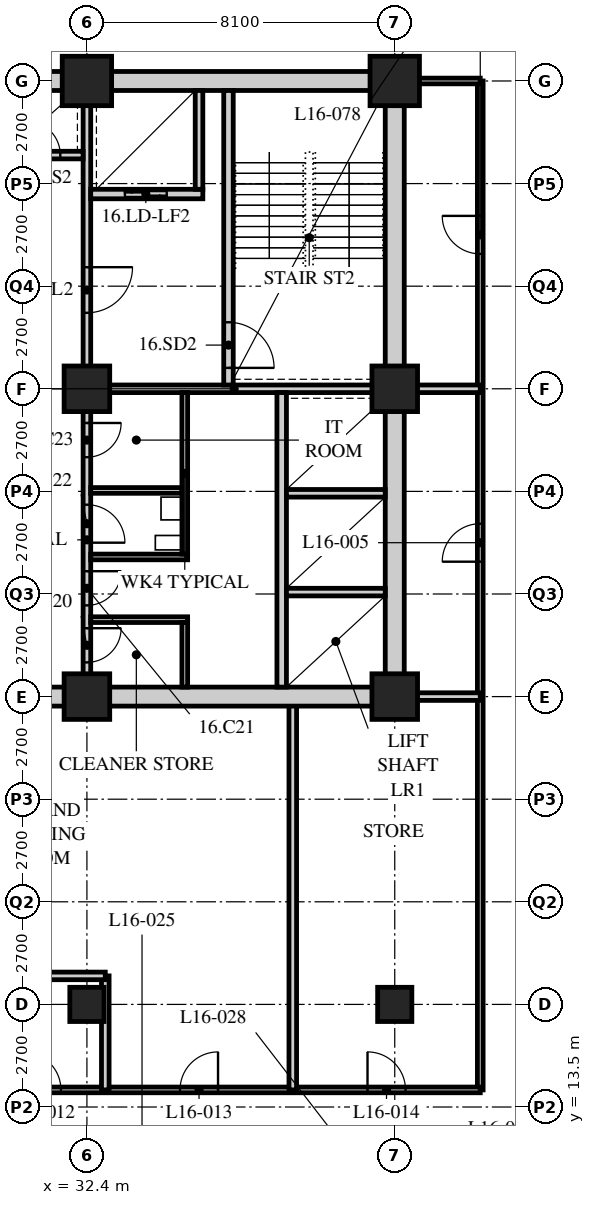
"""IFC4 building model, lengths in metres.
Left out: names, types, materials, properties, quantities, classifications, styles, units other than length and angle.
Written with IfcOpenShell. Run it as: python <this file> out.ifc"""

import sys

from ifc_helpers import new_model, si_unit, direction, frame, frame_2d, origin, origin_2d, place, context, subcontext, project, spatial, rectangle, hollow_rectangle, extrude, element, fill, save


model = new_model("IFC4")
c1 = context("Model", 3, precision=1e-05, world=origin(), true_north=direction((0.0, 1.0)))
c2 = subcontext(c1, "Body", "Model", "MODEL_VIEW")
j1 = project(units=[si_unit("LENGTHUNIT", "METRE"), si_unit("PLANEANGLEUNIT", "RADIAN")], contexts=[c1])
p1 = place(None, origin())
s1 = spatial("IfcSite", under=j1, at=p1, CompositionType="ELEMENT")
p2 = place(p1, origin())
s2 = spatial("IfcBuilding", under=s1, at=p2, CompositionType="ELEMENT")
p3 = place(p2, frame((0.0, 0.0, 67.0)))
s3 = spatial("IfcBuildingStorey", under=s2, at=p3, CompositionType="ELEMENT", Elevation=67.0)
p4 = place(p3, frame((32.4, 16.2, 0.0), z_axis=(0.0, 0.0, 1.0), x_axis=(1.0, 0.0, 0.0)))
e1 = element("IfcColumn", 1, at=p4, inside=s3, PredefinedType="COLUMN", context=c2, shape_type="SweptSolid", body=[
    extrude(hollow_rectangle(XDim=0.9, YDim=0.9, WallThickness=0.09, at=origin_2d()), origin(), (0.0, 0.0, 1.0), 3.4),
])
for number, where, z_axis, x_axis in (
    (2, (32.4, 24.3, 0.0), (0.0, 0.0, 1.0), (1.0, 0.0, 0.0)),
    (3, (32.4, 32.4, 0.0), (0.0, 0.0, 1.0), (1.0, 0.0, 0.0)),
):
    element("IfcColumn", number, at=place(p3, frame(where, z_axis=z_axis, x_axis=x_axis)), inside=s3, PredefinedType="COLUMN", context=c2, shape_type="SweptSolid", body=[
        extrude(hollow_rectangle(XDim=1.2, YDim=1.2, WallThickness=0.12, at=origin_2d()), origin(), (0.0, 0.0, 1.0), 3.4),
    ])
p5 = place(p3, frame((32.4, 40.5, 0.0), z_axis=(0.0, 0.0, 1.0), x_axis=(1.0, 0.0, 0.0)))
e4 = element("IfcColumn", 4, at=p5, inside=s3, PredefinedType="COLUMN", context=c2, shape_type="SweptSolid", body=[
    extrude(hollow_rectangle(XDim=1.3, YDim=1.3, WallThickness=0.13, at=origin_2d()), origin(), (0.0, 0.0, 1.0), 3.4),
])
p6 = place(p3, frame((40.5, 16.2, 0.0), z_axis=(0.0, 0.0, 1.0), x_axis=(1.0, 0.0, 0.0)))
e5 = element("IfcColumn", 5, at=p6, inside=s3, PredefinedType="COLUMN", context=c2, shape_type="SweptSolid", body=[
    extrude(hollow_rectangle(XDim=0.9, YDim=0.9, WallThickness=0.09, at=origin_2d()), origin(), (0.0, 0.0, 1.0), 3.4),
])
for number, where, z_axis, x_axis in (
    (6, (40.5, 24.3, 0.0), (0.0, 0.0, 1.0), (1.0, 0.0, 0.0)),
    (7, (40.5, 32.4, 0.0), (0.0, 0.0, 1.0), (1.0, 0.0, 0.0)),
):
    element("IfcColumn", number, at=place(p3, frame(where, z_axis=z_axis, x_axis=x_axis)), inside=s3, PredefinedType="COLUMN", context=c2, shape_type="SweptSolid", body=[
        extrude(hollow_rectangle(XDim=1.2, YDim=1.2, WallThickness=0.12, at=origin_2d()), origin(), (0.0, 0.0, 1.0), 3.4),
    ])
p7 = place(p3, frame((40.5, 40.5, 0.0), z_axis=(0.0, 0.0, 1.0), x_axis=(1.0, 0.0, 0.0)))
e8 = element("IfcColumn", 8, at=p7, inside=s3, PredefinedType="COLUMN", context=c2, shape_type="SweptSolid", body=[
    extrude(hollow_rectangle(XDim=1.3, YDim=1.3, WallThickness=0.13, at=origin_2d()), origin(), (0.0, 0.0, 1.0), 3.4),
])
p8 = place(p3, frame((42.75, 13.95, 0.0), z_axis=(0.0, 0.0, 1.0), x_axis=(0.0, 1.0, 0.0)))
e9 = element("IfcWall", 9, at=p8, inside=s3, PredefinedType="PARTITIONING", context=c2, shape_type="SweptSolid", body=[
    extrude(rectangle(XDim=26.55, YDim=0.15, at=frame_2d((13.275, 0.0))), origin(), (0.0, 0.0, 1.0), 3.19),
])
p9 = place(p8, frame((13.9, 0.0, 0.0)))
e10 = element("IfcOpeningElement", 10, at=p9, cuts=e9, PredefinedType="OPENING", context=c2, shape_type="SweptSolid", body=[
    extrude(rectangle(XDim=1.0, YDim=2.1, at=frame_2d((0.5, 1.05))), frame((0.0, 0.085, 0.0), z_axis=(0.0, -1.0, 0.0), x_axis=(1.0, 0.0, 0.0)), (0.0, 0.0, 1.0), 0.17),
])
p10 = place(p8, frame((22.0, 0.0, 0.0)))
e11 = element("IfcOpeningElement", 11, at=p10, cuts=e9, PredefinedType="OPENING", context=c2, shape_type="SweptSolid", body=[
    extrude(rectangle(XDim=1.0, YDim=2.1, at=frame_2d((0.5, 1.05))), frame((0.0, 0.085, 0.0), z_axis=(0.0, -1.0, 0.0), x_axis=(1.0, 0.0, 0.0)), (0.0, 0.0, 1.0), 0.17),
])
p11 = place(p3, frame((42.75, 40.5, 0.0), z_axis=(0.0, 0.0, 1.0), x_axis=(-1.0, 0.0, 0.0)))
e12 = element("IfcWall", 12, at=p11, inside=s3, PredefinedType="PARTITIONING", context=c2, shape_type="SweptSolid", body=[
    extrude(rectangle(XDim=2.05, YDim=0.15, at=frame_2d((1.025, 0.0))), origin(), (0.0, 0.0, 1.0), 2.578),
])
p12 = place(p3, frame((29.56, 13.95, 0.0), z_axis=(0.0, 0.0, 1.0), x_axis=(1.0, 0.0, 0.0)))
e13 = element("IfcWall", 13, at=p12, inside=s3, PredefinedType="PARTITIONING", context=c2, shape_type="SweptSolid", body=[
    extrude(rectangle(XDim=13.19, YDim=0.15, at=frame_2d((6.595, 0.0))), origin(), (0.0, 0.0, 1.0), 3.19),
])
p13 = place(p12, frame((1.157, 0.0, 0.0)))
e14 = element("IfcOpeningElement", 14, at=p13, cuts=e13, PredefinedType="OPENING", context=c2, shape_type="SweptSolid", body=[
    extrude(rectangle(XDim=1.0, YDim=2.1, at=frame_2d((0.5, 1.05))), frame((0.0, 0.085, 0.0), z_axis=(0.0, -1.0, 0.0), x_axis=(1.0, 0.0, 0.0)), (0.0, 0.0, 1.0), 0.17),
])
p14 = place(p12, frame((5.29, 0.0, 0.0)))
e15 = element("IfcOpeningElement", 15, at=p14, cuts=e13, PredefinedType="OPENING", context=c2, shape_type="SweptSolid", body=[
    extrude(rectangle(XDim=1.0, YDim=2.1, at=frame_2d((0.5, 1.05))), frame((0.0, 0.085, 0.0), z_axis=(0.0, -1.0, 0.0), x_axis=(1.0, 0.0, 0.0)), (0.0, 0.0, 1.0), 0.17),
])
p15 = place(p12, frame((10.223, 0.0, 0.0)))
e16 = element("IfcOpeningElement", 16, at=p15, cuts=e13, PredefinedType="OPENING", context=c2, shape_type="SweptSolid", body=[
    extrude(rectangle(XDim=1.0, YDim=2.1, at=frame_2d((0.5, 1.05))), frame((0.0, 0.085, 0.0), z_axis=(0.0, -1.0, 0.0), x_axis=(1.0, 0.0, 0.0)), (0.0, 0.0, 1.0), 0.17),
])
p16 = place(p3, frame((40.5, 32.4, 0.0), z_axis=(0.0, 0.0, 1.0), x_axis=(1.0, 0.0, 0.0)))
e17 = element("IfcWall", 17, at=p16, inside=s3, PredefinedType="SOLIDWALL", context=c2, shape_type="SweptSolid", body=[
    extrude(rectangle(XDim=2.25, YDim=0.2, at=frame_2d((1.125, 0.0))), origin(), (0.0, 0.0, 1.0), 2.578),
])
p17 = place(p3, frame((32.883, 13.95, 0.0), z_axis=(0.0, 0.0, 1.0), x_axis=(0.0, 1.0, 0.0)))
e18 = element("IfcWall", 18, at=p17, inside=s3, PredefinedType="SOLIDWALL", context=c2, shape_type="SweptSolid", body=[
    extrude(rectangle(XDim=3.0, YDim=0.2, at=frame_2d((1.5, 0.0))), origin(), (0.0, 0.0, 1.0), 3.19),
])
p18 = place(p3, frame((29.55, 16.95, 0.0), z_axis=(0.0, 0.0, 1.0), x_axis=(1.0, 0.0, 0.0)))
e19 = element("IfcWall", 19, at=p18, inside=s3, PredefinedType="SOLIDWALL", context=c2, shape_type="SweptSolid", body=[
    extrude(rectangle(XDim=3.333, YDim=0.2, at=frame_2d((1.667, 0.0))), origin(), (0.0, 0.0, 1.0), 3.19),
])
p19 = place(p3, frame((37.817, 13.95, 0.0), z_axis=(0.0, 0.0, 1.0), x_axis=(0.0, 1.0, 0.0)))
e20 = element("IfcWall", 20, at=p19, inside=s3, PredefinedType="SOLIDWALL", context=c2, shape_type="SweptSolid", body=[
    extrude(rectangle(XDim=10.35, YDim=0.2, at=frame_2d((5.175, 0.0))), origin(), (0.0, 0.0, 1.0), 3.19),
])
p20 = place(p3, frame((40.5, 24.3, 0.0), z_axis=(0.0, 0.0, 1.0), x_axis=(1.0, 0.0, 0.0)))
e21 = element("IfcWall", 21, at=p20, inside=s3, PredefinedType="SOLIDWALL", context=c2, shape_type="SweptSolid", body=[
    extrude(rectangle(XDim=2.25, YDim=0.2, at=frame_2d((1.125, 0.0))), origin(), (0.0, 0.0, 1.0), 2.578),
])
p21 = place(p3, frame((15.95, 24.3, 0.0), z_axis=(0.0, 0.0, 1.0), x_axis=(1.0, 0.0, 0.0)))
e22 = element("IfcWall", 22, at=p21, inside=s3, PredefinedType="SOLIDWALL", context=c2, shape_type="SweptSolid", body=[
    extrude(rectangle(XDim=24.8, YDim=0.5, at=frame_2d((12.4, 0.0))), origin(), (0.0, 0.0, 1.0), 2.54),
])
p22 = place(p21, frame((11.5, 0.0, 0.0)))
e23 = element("IfcOpeningElement", 23, at=p22, cuts=e22, PredefinedType="OPENING", context=c2, shape_type="SweptSolid", body=[
    extrude(rectangle(XDim=1.8, YDim=2.4, at=frame_2d((0.9, 1.2))), frame((0.0, 0.26, 0.0), z_axis=(0.0, -1.0, 0.0), x_axis=(1.0, 0.0, 0.0)), (0.0, 0.0, 1.0), 0.52),
])
p23 = place(p3, frame((15.95, 40.5, 0.0), z_axis=(0.0, 0.0, 1.0), x_axis=(1.0, 0.0, 0.0)))
e24 = element("IfcWall", 24, at=p23, inside=s3, PredefinedType="SOLIDWALL", context=c2, shape_type="SweptSolid", body=[
    extrude(rectangle(XDim=24.8, YDim=0.5, at=frame_2d((12.4, 0.0))), origin(), (0.0, 0.0, 1.0), 2.54),
])
p24 = place(p23, frame((11.5, 0.0, 0.0)))
e25 = element("IfcOpeningElement", 25, at=p24, cuts=e24, PredefinedType="OPENING", context=c2, shape_type="SweptSolid", body=[
    extrude(rectangle(XDim=1.8, YDim=2.4, at=frame_2d((0.9, 1.2))), frame((0.0, 0.26, 0.0), z_axis=(0.0, -1.0, 0.0), x_axis=(1.0, 0.0, 0.0)), (0.0, 0.0, 1.0), 0.52),
])
p25 = place(p3, frame((40.5, 24.55, 0.0), z_axis=(0.0, 0.0, 1.0), x_axis=(0.0, 1.0, 0.0)))
e26 = element("IfcWall", 26, at=p25, inside=s3, PredefinedType="SOLIDWALL", context=c2, shape_type="SweptSolid", body=[
    extrude(rectangle(XDim=15.7, YDim=0.5, at=frame_2d((7.85, 0.0))), origin(), (0.0, 0.0, 1.0), 2.578),
])
p26 = place(p3, frame((32.3, 32.4, 0.0), z_axis=(0.0, 0.0, 1.0), x_axis=(1.0, 0.0, 0.0)))
e27 = element("IfcWall", 27, at=p26, inside=s3, PredefinedType="SOLIDWALL", context=c2, shape_type="SweptSolid", body=[
    extrude(rectangle(XDim=7.95, YDim=0.2, at=frame_2d((3.975, 0.0))), origin(), (0.0, 0.0, 1.0), 2.578),
])
p27 = place(p3, frame((32.4, 32.5, 0.0), z_axis=(0.0, 0.0, 1.0), x_axis=(0.0, 1.0, 0.0)))
e28 = element("IfcWall", 28, at=p27, inside=s3, PredefinedType="SOLIDWALL", context=c2, shape_type="SweptSolid", body=[
    extrude(rectangle(XDim=7.75, YDim=0.2, at=frame_2d((3.875, 0.0))), origin(), (0.0, 0.0, 1.0), 2.578),
])
p28 = place(p27, frame((1.9, 0.0, 0.0)))
e29 = element("IfcOpeningElement", 29, at=p28, cuts=e28, PredefinedType="OPENING", context=c2, shape_type="SweptSolid", body=[
    extrude(rectangle(XDim=1.2, YDim=2.1, at=frame_2d((0.6, 1.05))), frame((0.0, 0.11, 0.0), z_axis=(0.0, -1.0, 0.0), x_axis=(1.0, 0.0, 0.0)), (0.0, 0.0, 1.0), 0.22),
])
p29 = place(p3, frame((37.525, 24.55, 0.0), z_axis=(0.0, 0.0, 1.0), x_axis=(0.0, 1.0, 0.0)))
e30 = element("IfcWall", 30, at=p29, inside=s3, PredefinedType="SOLIDWALL", context=c2, shape_type="SweptSolid", body=[
    extrude(rectangle(XDim=7.75, YDim=0.25, at=frame_2d((3.875, 0.0))), origin(), (0.0, 0.0, 1.0), 3.19),
])
for number, where, z_axis, x_axis in (
    (31, (37.65, 27.05, 0.0), (0.0, 0.0, 1.0), (1.0, 0.0, 0.0)),
    (32, (37.65, 29.65, 0.0), (0.0, 0.0, 1.0), (1.0, 0.0, 0.0)),
):
    element("IfcWall", number, at=place(p3, frame(where, z_axis=z_axis, x_axis=x_axis)), inside=s3, PredefinedType="SOLIDWALL", context=c2, shape_type="SweptSolid", body=[
        extrude(rectangle(XDim=2.6, YDim=0.2, at=frame_2d((1.3, 0.0))), origin(), (0.0, 0.0, 1.0), 3.19),
    ])
p30 = place(p3, frame((36.125, 32.5, 0.0), z_axis=(0.0, 0.0, 1.0), x_axis=(0.0, 1.0, 0.0)))
e33 = element("IfcWall", 33, at=p30, inside=s3, PredefinedType="SOLIDWALL", context=c2, shape_type="SweptSolid", body=[
    extrude(rectangle(XDim=7.75, YDim=0.25, at=frame_2d((3.875, 0.0))), origin(), (0.0, 0.0, 1.0), 3.19),
])
p31 = place(p30, frame((0.45, 0.0, 0.0)))
e34 = element("IfcOpeningElement", 34, at=p31, cuts=e33, PredefinedType="OPENING", context=c2, shape_type="SweptSolid", body=[
    extrude(rectangle(XDim=1.2, YDim=2.1, at=frame_2d((0.6, 1.05))), frame((0.0, 0.135, 0.0), z_axis=(0.0, -1.0, 0.0), x_axis=(1.0, 0.0, 0.0)), (0.0, 0.0, 1.0), 0.27),
])
p32 = place(p3, frame((32.5, 37.525, 0.0), z_axis=(0.0, 0.0, 1.0), x_axis=(1.0, 0.0, 0.0)))
e35 = element("IfcWall", 35, at=p32, inside=s3, PredefinedType="SOLIDWALL", context=c2, shape_type="SweptSolid", body=[
    extrude(rectangle(XDim=2.95, YDim=0.25, at=frame_2d((1.475, 0.0))), origin(), (0.0, 0.0, 1.0), 3.19),
])
p33 = place(p32, frame((0.9, 0.0, 0.0)))
e36 = element("IfcOpeningElement", 36, at=p33, cuts=e35, PredefinedType="OPENING", context=c2, shape_type="SweptSolid", body=[
    extrude(rectangle(XDim=1.1, YDim=2.4, at=frame_2d((0.55, 1.2))), frame((0.0, 0.135, 0.0), z_axis=(0.0, -1.0, 0.0), x_axis=(1.0, 0.0, 0.0)), (0.0, 0.0, 1.0), 0.27),
])
p34 = place(p3, frame((35.35, 37.65, 0.0), z_axis=(0.0, 0.0, 1.0), x_axis=(0.0, 1.0, 0.0)))
e37 = element("IfcWall", 37, at=p34, inside=s3, PredefinedType="SOLIDWALL", context=c2, shape_type="SweptSolid", body=[
    extrude(rectangle(XDim=2.6, YDim=0.2, at=frame_2d((1.3, 0.0))), origin(), (0.0, 0.0, 1.0), 3.19),
])
p35 = place(p3, frame((30.15, 38.55, 0.0), z_axis=(0.0, 0.0, 1.0), x_axis=(1.0, 0.0, 0.0)))
e38 = element("IfcWall", 38, at=p35, inside=s3, PredefinedType="SOLIDWALL", context=c2, shape_type="SweptSolid", body=[
    extrude(rectangle(XDim=2.15, YDim=0.2, at=frame_2d((1.075, 0.0))), origin(), (0.0, 0.0, 1.0), 3.19),
])
p36 = place(p35, frame((0.65, 0.0, 0.0)))
e39 = element("IfcOpeningElement", 39, at=p36, cuts=e38, PredefinedType="OPENING", context=c2, shape_type="SweptSolid", body=[
    extrude(rectangle(XDim=0.9, YDim=2.1, at=frame_2d((0.45, 1.05))), frame((0.0, 0.11, 0.0), z_axis=(0.0, -1.0, 0.0), x_axis=(1.0, 0.0, 0.0)), (0.0, 0.0, 1.0), 0.22),
])
p37 = place(p3, frame((32.4, 24.55, 0.0), z_axis=(0.0, 0.0, 1.0), x_axis=(0.0, 1.0, 0.0)))
e40 = element("IfcWall", 40, at=p37, inside=s3, PredefinedType="PARTITIONING", context=c2, shape_type="SweptSolid", body=[
    extrude(rectangle(XDim=7.75, YDim=0.2, at=frame_2d((3.875, 0.0))), origin(), (0.0, 0.0, 1.0), 2.578),
])
p38 = place(p37, frame((0.65, 0.0, 0.0)))
e41 = element("IfcOpeningElement", 41, at=p38, cuts=e40, PredefinedType="OPENING", context=c2, shape_type="SweptSolid", body=[
    extrude(rectangle(XDim=0.9, YDim=2.1, at=frame_2d((0.45, 1.05))), frame((0.0, 0.11, 0.0), z_axis=(0.0, -1.0, 0.0), x_axis=(1.0, 0.0, 0.0)), (0.0, 0.0, 1.0), 0.22),
])
p39 = place(p37, frame((2.15, 0.0, 0.0)))
e42 = element("IfcOpeningElement", 42, at=p39, cuts=e40, PredefinedType="OPENING", context=c2, shape_type="SweptSolid", body=[
    extrude(rectangle(XDim=0.9, YDim=2.1, at=frame_2d((0.45, 1.05))), frame((0.0, 0.11, 0.0), z_axis=(0.0, -1.0, 0.0), x_axis=(1.0, 0.0, 0.0)), (0.0, 0.0, 1.0), 0.22),
])
p40 = place(p37, frame((3.8, 0.0, 0.0)))
e43 = element("IfcOpeningElement", 43, at=p40, cuts=e40, PredefinedType="OPENING", context=c2, shape_type="SweptSolid", body=[
    extrude(rectangle(XDim=1.0, YDim=2.1, at=frame_2d((0.5, 1.05))), frame((0.0, 0.11, 0.0), z_axis=(0.0, -1.0, 0.0), x_axis=(1.0, 0.0, 0.0)), (0.0, 0.0, 1.0), 0.22),
])
p41 = place(p37, frame((6.05, 0.0, 0.0)))
e44 = element("IfcOpeningElement", 44, at=p41, cuts=e40, PredefinedType="OPENING", context=c2, shape_type="SweptSolid", body=[
    extrude(rectangle(XDim=0.9, YDim=2.1, at=frame_2d((0.45, 1.05))), frame((0.0, 0.11, 0.0), z_axis=(0.0, -1.0, 0.0), x_axis=(1.0, 0.0, 0.0)), (0.0, 0.0, 1.0), 0.22),
])
for number, where, z_axis, x_axis in (
    (45, (32.5, 26.325, 0.0), (0.0, 0.0, 1.0), (1.0, 0.0, 0.0)),
    (46, (32.5, 27.975, 0.0), (0.0, 0.0, 1.0), (1.0, 0.0, 0.0)),
):
    element("IfcWall", number, at=place(p3, frame(where, z_axis=z_axis, x_axis=x_axis)), inside=s3, PredefinedType="PARTITIONING", context=c2, shape_type="SweptSolid", body=[
        extrude(rectangle(XDim=2.55, YDim=0.15, at=frame_2d((1.275, 0.0))), origin(), (0.0, 0.0, 1.0), 3.19),
    ])
p42 = place(p3, frame((32.5, 29.725, 0.0), z_axis=(0.0, 0.0, 1.0), x_axis=(1.0, 0.0, 0.0)))
e47 = element("IfcWall", 47, at=p42, inside=s3, PredefinedType="PARTITIONING", context=c2, shape_type="SweptSolid", body=[
    extrude(rectangle(XDim=2.4, YDim=0.15, at=frame_2d((1.2, 0.0))), origin(), (0.0, 0.0, 1.0), 3.19),
])
p43 = place(p3, frame((34.975, 24.55, 0.0), z_axis=(0.0, 0.0, 1.0), x_axis=(0.0, 1.0, 0.0)))
e48 = element("IfcWall", 48, at=p43, inside=s3, PredefinedType="PARTITIONING", context=c2, shape_type="SweptSolid", body=[
    extrude(rectangle(XDim=1.7, YDim=0.15, at=frame_2d((0.85, 0.0))), origin(), (0.0, 0.0, 1.0), 3.19),
])
p44 = place(p3, frame((34.975, 28.05, 0.0), z_axis=(0.0, 0.0, 1.0), x_axis=(0.0, 1.0, 0.0)))
e49 = element("IfcWall", 49, at=p44, inside=s3, PredefinedType="PARTITIONING", context=c2, shape_type="SweptSolid", body=[
    extrude(rectangle(XDim=4.25, YDim=0.15, at=frame_2d((2.125, 0.0))), origin(), (0.0, 0.0, 1.0), 3.19),
])
p45 = place(p9, origin())
e50 = element("IfcDoor", 50, at=p45, inside=s3, OperationType="SINGLE_SWING_LEFT", PredefinedType="DOOR", context=c2, shape_type="SweptSolid", body=[
    extrude(rectangle(XDim=1.0, YDim=2.1, at=frame_2d((0.5, 1.05))), frame((0.0, 0.025, 0.0), z_axis=(0.0, -1.0, 0.0), x_axis=(1.0, 0.0, 0.0)), (0.0, 0.0, 1.0), 0.05),
])
fill(e10, e50)
p46 = place(p10, origin())
e51 = element("IfcDoor", 51, at=p46, inside=s3, OperationType="SINGLE_SWING_RIGHT", PredefinedType="DOOR", context=c2, shape_type="SweptSolid", body=[
    extrude(rectangle(XDim=1.0, YDim=2.1, at=frame_2d((0.5, 1.05))), frame((0.0, 0.025, 0.0), z_axis=(0.0, -1.0, 0.0), x_axis=(1.0, 0.0, 0.0)), (0.0, 0.0, 1.0), 0.05),
])
fill(e11, e51)
p47 = place(p13, origin())
e52 = element("IfcDoor", 52, at=p47, inside=s3, OperationType="SINGLE_SWING_LEFT", PredefinedType="DOOR", context=c2, shape_type="SweptSolid", body=[
    extrude(rectangle(XDim=1.0, YDim=2.1, at=frame_2d((0.5, 1.05))), frame((0.0, 0.025, 0.0), z_axis=(0.0, -1.0, 0.0), x_axis=(1.0, 0.0, 0.0)), (0.0, 0.0, 1.0), 0.05),
])
fill(e14, e52)
p48 = place(p14, origin())
e53 = element("IfcDoor", 53, at=p48, inside=s3, OperationType="SINGLE_SWING_RIGHT", PredefinedType="DOOR", context=c2, shape_type="SweptSolid", body=[
    extrude(rectangle(XDim=1.0, YDim=2.1, at=frame_2d((0.5, 1.05))), frame((0.0, 0.025, 0.0), z_axis=(0.0, -1.0, 0.0), x_axis=(1.0, 0.0, 0.0)), (0.0, 0.0, 1.0), 0.05),
])
fill(e15, e53)
p49 = place(p15, origin())
e54 = element("IfcDoor", 54, at=p49, inside=s3, OperationType="SINGLE_SWING_LEFT", PredefinedType="DOOR", context=c2, shape_type="SweptSolid", body=[
    extrude(rectangle(XDim=1.0, YDim=2.1, at=frame_2d((0.5, 1.05))), frame((0.0, 0.025, 0.0), z_axis=(0.0, -1.0, 0.0), x_axis=(1.0, 0.0, 0.0)), (0.0, 0.0, 1.0), 0.05),
])
fill(e16, e54)
p50 = place(p38, origin())
e55 = element("IfcDoor", 55, at=p50, inside=s3, OperationType="SINGLE_SWING_LEFT", PredefinedType="DOOR", context=c2, shape_type="SweptSolid", body=[
    extrude(rectangle(XDim=0.9, YDim=2.1, at=frame_2d((0.45, 1.05))), frame((0.0, 0.025, 0.0), z_axis=(0.0, -1.0, 0.0), x_axis=(1.0, 0.0, 0.0)), (0.0, 0.0, 1.0), 0.05),
])
fill(e41, e55)
p51 = place(p39, origin())
e56 = element("IfcDoor", 56, at=p51, inside=s3, OperationType="SINGLE_SWING_LEFT", PredefinedType="DOOR", context=c2, shape_type="SweptSolid", body=[
    extrude(rectangle(XDim=0.9, YDim=2.1, at=frame_2d((0.45, 1.05))), frame((0.0, 0.025, 0.0), z_axis=(0.0, -1.0, 0.0), x_axis=(1.0, 0.0, 0.0)), (0.0, 0.0, 1.0), 0.05),
])
fill(e42, e56)
p52 = place(p40, origin())
e57 = element("IfcDoor", 57, at=p52, inside=s3, OperationType="SINGLE_SWING_RIGHT", PredefinedType="DOOR", context=c2, shape_type="SweptSolid", body=[
    extrude(rectangle(XDim=1.0, YDim=2.1, at=frame_2d((0.5, 1.05))), frame((0.0, 0.025, 0.0), z_axis=(0.0, -1.0, 0.0), x_axis=(1.0, 0.0, 0.0)), (0.0, 0.0, 1.0), 0.05),
])
fill(e43, e57)
p53 = place(p41, origin())
e58 = element("IfcDoor", 58, at=p53, inside=s3, OperationType="SINGLE_SWING_LEFT", PredefinedType="DOOR", context=c2, shape_type="SweptSolid", body=[
    extrude(rectangle(XDim=0.9, YDim=2.1, at=frame_2d((0.45, 1.05))), frame((0.0, 0.025, 0.0), z_axis=(0.0, -1.0, 0.0), x_axis=(1.0, 0.0, 0.0)), (0.0, 0.0, 1.0), 0.05),
])
fill(e44, e58)
p54 = place(p31, origin())
e59 = element("IfcDoor", 59, at=p54, inside=s3, OperationType="SINGLE_SWING_RIGHT", PredefinedType="DOOR", context=c2, shape_type="SweptSolid", body=[
    extrude(rectangle(XDim=1.2, YDim=2.1, at=frame_2d((0.6, 1.05))), frame((0.0, 0.025, 0.0), z_axis=(0.0, -1.0, 0.0), x_axis=(1.0, 0.0, 0.0)), (0.0, 0.0, 1.0), 0.05),
])
fill(e34, e59)
p55 = place(p28, origin())
e60 = element("IfcDoor", 60, at=p55, inside=s3, OperationType="SINGLE_SWING_LEFT", PredefinedType="DOOR", context=c2, shape_type="SweptSolid", body=[
    extrude(rectangle(XDim=1.2, YDim=2.1, at=frame_2d((0.6, 1.05))), frame((0.0, 0.025, 0.0), z_axis=(0.0, -1.0, 0.0), x_axis=(1.0, 0.0, 0.0)), (0.0, 0.0, 1.0), 0.05),
])
fill(e29, e60)
p56 = place(p36, origin())
e61 = element("IfcDoor", 61, at=p56, inside=s3, OperationType="SINGLE_SWING_LEFT", PredefinedType="DOOR", context=c2, shape_type="SweptSolid", body=[
    extrude(rectangle(XDim=0.9, YDim=2.1, at=frame_2d((0.45, 1.05))), frame((0.0, 0.025, 0.0), z_axis=(0.0, -1.0, 0.0), x_axis=(1.0, 0.0, 0.0)), (0.0, 0.0, 1.0), 0.05),
])
fill(e39, e61)
p57 = place(p33, origin())
e62 = element("IfcDoor", 62, at=p57, inside=s3, OperationType="DOUBLE_DOOR_SLIDING", PredefinedType="DOOR", context=c2, shape_type="SweptSolid", body=[
    extrude(rectangle(XDim=1.1, YDim=2.4, at=frame_2d((0.55, 1.2))), frame((0.0, 0.025, 0.0), z_axis=(0.0, -1.0, 0.0), x_axis=(1.0, 0.0, 0.0)), (0.0, 0.0, 1.0), 0.05),
])
fill(e36, e62)
save(model, sys.argv[1])
